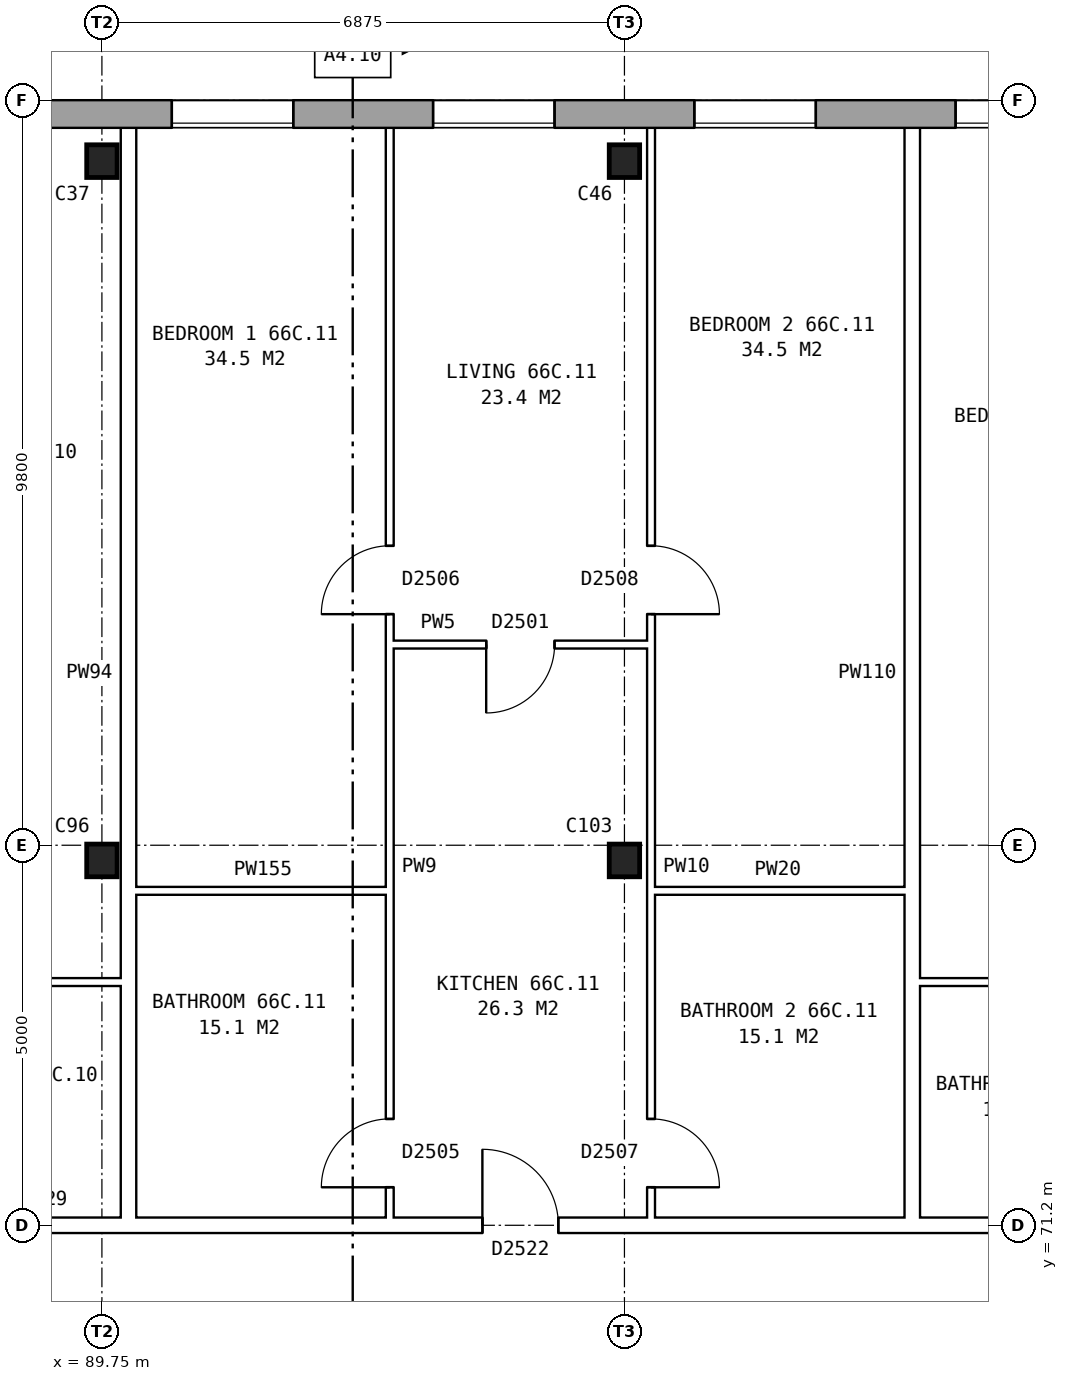
"""IFC4 building model, lengths in metres.
Left out: names, types, materials, properties, quantities, classifications, styles, units other than length and angle.
Written with IfcOpenShell. Run it as: python <this file> out.ifc"""

import sys

from ifc_helpers import new_model, si_unit, direction, frame, frame_2d, origin, origin_2d, place, context, subcontext, project, spatial, rectangle, i_section, extrude, element, fill, save


model = new_model("IFC4")
c1 = context("Model", 3, precision=1e-05, world=origin(), true_north=direction((0.0, 1.0)))
c2 = subcontext(c1, "Body", "Model", "MODEL_VIEW")
j1 = project(units=[si_unit("LENGTHUNIT", "METRE"), si_unit("PLANEANGLEUNIT", "RADIAN")], contexts=[c1])
p1 = place(None, origin())
s1 = spatial("IfcSite", under=j1, at=p1, CompositionType="ELEMENT")
p2 = place(p1, origin())
s2 = spatial("IfcBuilding", under=s1, at=p2, CompositionType="ELEMENT")
p3 = place(p2, frame((0.0, 0.0, 233.8)))
s3 = spatial("IfcBuildingStorey", under=s2, at=p3, CompositionType="ELEMENT", Elevation=233.8)
for number, where, z_axis, x_axis in (
    (1, (89.75, 76.0, 0.0), (0.0, 0.0, 1.0), (1.0, 0.0, 0.0)),
    (2, (96.625, 76.0, 0.0), (0.0, 0.0, 1.0), (1.0, 0.0, 0.0)),
    (3, (89.75, 85.2, 0.0), (0.0, 0.0, 1.0), (1.0, 0.0, 0.0)),
    (4, (96.625, 85.2, 0.0), (0.0, 0.0, 1.0), (1.0, 0.0, 0.0)),
):
    element("IfcColumn", number, at=place(p3, frame(where, z_axis=z_axis, x_axis=x_axis)), inside=s3, PredefinedType="COLUMN", context=c2, shape_type="SweptSolid", body=[
        extrude(i_section(OverallWidth=0.4, OverallDepth=0.43, WebThickness=0.028, FlangeThickness=0.04, at=origin_2d()), origin(), (0.0, 0.0, 1.0), 2.85),
    ])
p4 = place(p3, frame((131.05, 85.82, 0.0), z_axis=(0.0, 0.0, 1.0), x_axis=(-1.0, 0.0, 0.0)))
e5 = element("IfcWall", 5, at=p4, inside=s3, PredefinedType="STANDARD", context=c2, shape_type="SweptSolid", body=[
    extrude(rectangle(XDim=55.1, YDim=0.36, at=frame_2d((27.55, 0.0))), origin(), (0.0, 0.0, 1.0), 2.85),
])
p5 = place(p4, frame((0.969, 0.0, 0.8)))
e6 = element("IfcOpeningElement", 6, at=p5, cuts=e5, PredefinedType="OPENING", context=c2, shape_type="SweptSolid", body=[
    extrude(rectangle(XDim=1.6, YDim=1.8, at=frame_2d((0.8, 0.9))), frame((0.0, 0.19, 0.0), z_axis=(0.0, -1.0, 0.0), x_axis=(1.0, 0.0, 0.0)), (0.0, 0.0, 1.0), 0.38),
])
p6 = place(p4, frame((4.406, 0.0, 0.8)))
e7 = element("IfcOpeningElement", 7, at=p6, cuts=e5, PredefinedType="OPENING", context=c2, shape_type="SweptSolid", body=[
    extrude(rectangle(XDim=1.6, YDim=1.8, at=frame_2d((0.8, 0.9))), frame((0.0, 0.19, 0.0), z_axis=(0.0, -1.0, 0.0), x_axis=(1.0, 0.0, 0.0)), (0.0, 0.0, 1.0), 0.38),
])
p7 = place(p4, frame((7.844, 0.0, 0.8)))
e8 = element("IfcOpeningElement", 8, at=p7, cuts=e5, PredefinedType="OPENING", context=c2, shape_type="SweptSolid", body=[
    extrude(rectangle(XDim=1.6, YDim=1.8, at=frame_2d((0.8, 0.9))), frame((0.0, 0.19, 0.0), z_axis=(0.0, -1.0, 0.0), x_axis=(1.0, 0.0, 0.0)), (0.0, 0.0, 1.0), 0.38),
])
p8 = place(p4, frame((11.281, 0.0, 0.8)))
e9 = element("IfcOpeningElement", 9, at=p8, cuts=e5, PredefinedType="OPENING", context=c2, shape_type="SweptSolid", body=[
    extrude(rectangle(XDim=1.6, YDim=1.8, at=frame_2d((0.8, 0.9))), frame((0.0, 0.19, 0.0), z_axis=(0.0, -1.0, 0.0), x_axis=(1.0, 0.0, 0.0)), (0.0, 0.0, 1.0), 0.38),
])
p9 = place(p4, frame((14.719, 0.0, 0.8)))
e10 = element("IfcOpeningElement", 10, at=p9, cuts=e5, PredefinedType="OPENING", context=c2, shape_type="SweptSolid", body=[
    extrude(rectangle(XDim=1.6, YDim=1.8, at=frame_2d((0.8, 0.9))), frame((0.0, 0.19, 0.0), z_axis=(0.0, -1.0, 0.0), x_axis=(1.0, 0.0, 0.0)), (0.0, 0.0, 1.0), 0.38),
])
p10 = place(p4, frame((18.156, 0.0, 0.8)))
e11 = element("IfcOpeningElement", 11, at=p10, cuts=e5, PredefinedType="OPENING", context=c2, shape_type="SweptSolid", body=[
    extrude(rectangle(XDim=1.6, YDim=1.8, at=frame_2d((0.8, 0.9))), frame((0.0, 0.19, 0.0), z_axis=(0.0, -1.0, 0.0), x_axis=(1.0, 0.0, 0.0)), (0.0, 0.0, 1.0), 0.38),
])
p11 = place(p4, frame((21.594, 0.0, 0.8)))
e12 = element("IfcOpeningElement", 12, at=p11, cuts=e5, PredefinedType="OPENING", context=c2, shape_type="SweptSolid", body=[
    extrude(rectangle(XDim=1.6, YDim=1.8, at=frame_2d((0.8, 0.9))), frame((0.0, 0.19, 0.0), z_axis=(0.0, -1.0, 0.0), x_axis=(1.0, 0.0, 0.0)), (0.0, 0.0, 1.0), 0.38),
])
p12 = place(p4, frame((25.031, 0.0, 0.8)))
e13 = element("IfcOpeningElement", 13, at=p12, cuts=e5, PredefinedType="OPENING", context=c2, shape_type="SweptSolid", body=[
    extrude(rectangle(XDim=1.6, YDim=1.8, at=frame_2d((0.8, 0.9))), frame((0.0, 0.19, 0.0), z_axis=(0.0, -1.0, 0.0), x_axis=(1.0, 0.0, 0.0)), (0.0, 0.0, 1.0), 0.38),
])
p13 = place(p4, frame((28.469, 0.0, 0.8)))
e14 = element("IfcOpeningElement", 14, at=p13, cuts=e5, PredefinedType="OPENING", context=c2, shape_type="SweptSolid", body=[
    extrude(rectangle(XDim=1.6, YDim=1.8, at=frame_2d((0.8, 0.9))), frame((0.0, 0.19, 0.0), z_axis=(0.0, -1.0, 0.0), x_axis=(1.0, 0.0, 0.0)), (0.0, 0.0, 1.0), 0.38),
])
p14 = place(p4, frame((31.906, 0.0, 0.8)))
e15 = element("IfcOpeningElement", 15, at=p14, cuts=e5, PredefinedType="OPENING", context=c2, shape_type="SweptSolid", body=[
    extrude(rectangle(XDim=1.6, YDim=1.8, at=frame_2d((0.8, 0.9))), frame((0.0, 0.19, 0.0), z_axis=(0.0, -1.0, 0.0), x_axis=(1.0, 0.0, 0.0)), (0.0, 0.0, 1.0), 0.38),
])
p15 = place(p4, frame((35.344, 0.0, 0.8)))
e16 = element("IfcOpeningElement", 16, at=p15, cuts=e5, PredefinedType="OPENING", context=c2, shape_type="SweptSolid", body=[
    extrude(rectangle(XDim=1.6, YDim=1.8, at=frame_2d((0.8, 0.9))), frame((0.0, 0.19, 0.0), z_axis=(0.0, -1.0, 0.0), x_axis=(1.0, 0.0, 0.0)), (0.0, 0.0, 1.0), 0.38),
])
p16 = place(p4, frame((38.781, 0.0, 0.8)))
e17 = element("IfcOpeningElement", 17, at=p16, cuts=e5, PredefinedType="OPENING", context=c2, shape_type="SweptSolid", body=[
    extrude(rectangle(XDim=1.6, YDim=1.8, at=frame_2d((0.8, 0.9))), frame((0.0, 0.19, 0.0), z_axis=(0.0, -1.0, 0.0), x_axis=(1.0, 0.0, 0.0)), (0.0, 0.0, 1.0), 0.38),
])
p17 = place(p4, frame((42.219, 0.0, 0.8)))
e18 = element("IfcOpeningElement", 18, at=p17, cuts=e5, PredefinedType="OPENING", context=c2, shape_type="SweptSolid", body=[
    extrude(rectangle(XDim=1.6, YDim=1.8, at=frame_2d((0.8, 0.9))), frame((0.0, 0.19, 0.0), z_axis=(0.0, -1.0, 0.0), x_axis=(1.0, 0.0, 0.0)), (0.0, 0.0, 1.0), 0.38),
])
p18 = place(p4, frame((45.656, 0.0, 0.8)))
e19 = element("IfcOpeningElement", 19, at=p18, cuts=e5, PredefinedType="OPENING", context=c2, shape_type="SweptSolid", body=[
    extrude(rectangle(XDim=1.6, YDim=1.8, at=frame_2d((0.8, 0.9))), frame((0.0, 0.19, 0.0), z_axis=(0.0, -1.0, 0.0), x_axis=(1.0, 0.0, 0.0)), (0.0, 0.0, 1.0), 0.38),
])
p19 = place(p4, frame((49.094, 0.0, 0.8)))
e20 = element("IfcOpeningElement", 20, at=p19, cuts=e5, PredefinedType="OPENING", context=c2, shape_type="SweptSolid", body=[
    extrude(rectangle(XDim=1.6, YDim=1.8, at=frame_2d((0.8, 0.9))), frame((0.0, 0.19, 0.0), z_axis=(0.0, -1.0, 0.0), x_axis=(1.0, 0.0, 0.0)), (0.0, 0.0, 1.0), 0.38),
])
p20 = place(p4, frame((52.531, 0.0, 0.8)))
e21 = element("IfcOpeningElement", 21, at=p20, cuts=e5, PredefinedType="OPENING", context=c2, shape_type="SweptSolid", body=[
    extrude(rectangle(XDim=1.6, YDim=1.8, at=frame_2d((0.8, 0.9))), frame((0.0, 0.19, 0.0), z_axis=(0.0, -1.0, 0.0), x_axis=(1.0, 0.0, 0.0)), (0.0, 0.0, 1.0), 0.38),
])
p21 = place(p3, frame((83.225, 71.2, 0.0), z_axis=(0.0, 0.0, 1.0), x_axis=(1.0, 0.0, 0.0)))
e22 = element("IfcWall", 22, at=p21, inside=s3, PredefinedType="PARTITIONING", context=c2, shape_type="SweptSolid", body=[
    extrude(rectangle(XDim=41.25, YDim=0.2, at=frame_2d((20.625, 0.0))), origin(), (0.0, 0.0, 1.0), 2.85),
])
p22 = place(p21, frame((11.531, 0.0, 0.0)))
e23 = element("IfcOpeningElement", 23, at=p22, cuts=e22, PredefinedType="OPENING", context=c2, shape_type="SweptSolid", body=[
    extrude(rectangle(XDim=1.0, YDim=2.1, at=frame_2d((0.5, 1.05))), frame((0.0, 0.11, 0.0), z_axis=(0.0, -1.0, 0.0), x_axis=(1.0, 0.0, 0.0)), (0.0, 0.0, 1.0), 0.22),
])
p23 = place(p21, frame((21.844, 0.0, 0.0)))
e24 = element("IfcOpeningElement", 24, at=p23, cuts=e22, PredefinedType="OPENING", context=c2, shape_type="SweptSolid", body=[
    extrude(rectangle(XDim=1.0, YDim=2.1, at=frame_2d((0.5, 1.05))), frame((0.0, 0.11, 0.0), z_axis=(0.0, -1.0, 0.0), x_axis=(1.0, 0.0, 0.0)), (0.0, 0.0, 1.0), 0.22),
])
p24 = place(p21, frame((32.156, 0.0, 0.0)))
e25 = element("IfcOpeningElement", 25, at=p24, cuts=e22, PredefinedType="OPENING", context=c2, shape_type="SweptSolid", body=[
    extrude(rectangle(XDim=1.0, YDim=2.1, at=frame_2d((0.5, 1.05))), frame((0.0, 0.11, 0.0), z_axis=(0.0, -1.0, 0.0), x_axis=(1.0, 0.0, 0.0)), (0.0, 0.0, 1.0), 0.22),
])
p25 = place(p3, frame((86.662, 74.4, 0.0), z_axis=(0.0, 0.0, 1.0), x_axis=(1.0, 0.0, 0.0)))
e26 = element("IfcWall", 26, at=p25, inside=s3, PredefinedType="PARTITIONING", context=c2, shape_type="SweptSolid", body=[
    extrude(rectangle(XDim=3.338, YDim=0.1, at=frame_2d((1.669, 0.0))), origin(), (0.0, 0.0, 1.0), 2.85),
])
p26 = place(p3, frame((100.512, 74.4, 0.0), z_axis=(0.0, 0.0, 1.0), x_axis=(1.0, 0.0, 0.0)))
e27 = element("IfcWall", 27, at=p26, inside=s3, PredefinedType="PARTITIONING", context=c2, shape_type="SweptSolid", body=[
    extrude(rectangle(XDim=3.338, YDim=0.1, at=frame_2d((1.669, 0.0))), origin(), (0.0, 0.0, 1.0), 2.85),
])
p27 = place(p3, frame((90.2, 75.6, 0.0), z_axis=(0.0, 0.0, 1.0), x_axis=(1.0, 0.0, 0.0)))
e28 = element("IfcWall", 28, at=p27, inside=s3, PredefinedType="PARTITIONING", context=c2, shape_type="SweptSolid", body=[
    extrude(rectangle(XDim=3.337, YDim=0.1, at=frame_2d((1.668, 0.0))), origin(), (0.0, 0.0, 1.0), 2.85),
])
p28 = place(p3, frame((96.975, 75.6, 0.0), z_axis=(0.0, 0.0, 1.0), x_axis=(1.0, 0.0, 0.0)))
e29 = element("IfcWall", 29, at=p28, inside=s3, PredefinedType="PARTITIONING", context=c2, shape_type="SweptSolid", body=[
    extrude(rectangle(XDim=3.337, YDim=0.1, at=frame_2d((1.668, 0.0))), origin(), (0.0, 0.0, 1.0), 2.85),
])
p29 = place(p3, frame((93.537, 78.84, 0.0), z_axis=(0.0, 0.0, 1.0), x_axis=(1.0, 0.0, 0.0)))
e30 = element("IfcWall", 30, at=p29, inside=s3, PredefinedType="PARTITIONING", context=c2, shape_type="SweptSolid", body=[
    extrude(rectangle(XDim=3.438, YDim=0.1, at=frame_2d((1.719, 0.0))), origin(), (0.0, 0.0, 1.0), 2.85),
])
p30 = place(p29, frame((1.269, 0.0, 0.0)))
e31 = element("IfcOpeningElement", 31, at=p30, cuts=e30, PredefinedType="OPENING", context=c2, shape_type="SweptSolid", body=[
    extrude(rectangle(XDim=0.9, YDim=2.1, at=frame_2d((0.45, 1.05))), frame((0.0, 0.06, 0.0), z_axis=(0.0, -1.0, 0.0), x_axis=(1.0, 0.0, 0.0)), (0.0, 0.0, 1.0), 0.12),
])
p31 = place(p3, frame((90.1, 71.3, 0.0), z_axis=(0.0, 0.0, 1.0), x_axis=(0.0, 1.0, 0.0)))
e32 = element("IfcWall", 32, at=p31, inside=s3, PredefinedType="PARTITIONING", context=c2, shape_type="SweptSolid", body=[
    extrude(rectangle(XDim=14.34, YDim=0.2, at=frame_2d((7.17, 0.0))), origin(), (0.0, 0.0, 1.0), 2.85),
])
p32 = place(p3, frame((93.537, 71.3, 0.0), z_axis=(0.0, 0.0, 1.0), x_axis=(0.0, 1.0, 0.0)))
e33 = element("IfcWall", 33, at=p32, inside=s3, PredefinedType="PARTITIONING", context=c2, shape_type="SweptSolid", body=[
    extrude(rectangle(XDim=14.34, YDim=0.1, at=frame_2d((7.17, 0.0))), origin(), (0.0, 0.0, 1.0), 2.85),
])
p33 = place(p32, frame((7.94, 0.0, 0.0)))
e34 = element("IfcOpeningElement", 34, at=p33, cuts=e33, PredefinedType="OPENING", context=c2, shape_type="SweptSolid", body=[
    extrude(rectangle(XDim=0.9, YDim=2.1, at=frame_2d((0.45, 1.05))), frame((0.0, 0.06, 0.0), z_axis=(0.0, -1.0, 0.0), x_axis=(1.0, 0.0, 0.0)), (0.0, 0.0, 1.0), 0.12),
])
p34 = place(p32, frame((0.4, 0.0, 0.0)))
e35 = element("IfcOpeningElement", 35, at=p34, cuts=e33, PredefinedType="OPENING", context=c2, shape_type="SweptSolid", body=[
    extrude(rectangle(XDim=0.9, YDim=2.1, at=frame_2d((0.45, 1.05))), frame((0.0, 0.06, 0.0), z_axis=(0.0, -1.0, 0.0), x_axis=(1.0, 0.0, 0.0)), (0.0, 0.0, 1.0), 0.12),
])
p35 = place(p3, frame((96.975, 71.3, 0.0), z_axis=(0.0, 0.0, 1.0), x_axis=(0.0, 1.0, 0.0)))
e36 = element("IfcWall", 36, at=p35, inside=s3, PredefinedType="PARTITIONING", context=c2, shape_type="SweptSolid", body=[
    extrude(rectangle(XDim=14.34, YDim=0.1, at=frame_2d((7.17, 0.0))), origin(), (0.0, 0.0, 1.0), 2.85),
])
p36 = place(p35, frame((7.94, 0.0, 0.0)))
e37 = element("IfcOpeningElement", 37, at=p36, cuts=e36, PredefinedType="OPENING", context=c2, shape_type="SweptSolid", body=[
    extrude(rectangle(XDim=0.9, YDim=2.1, at=frame_2d((0.45, 1.05))), frame((0.0, 0.06, 0.0), z_axis=(0.0, -1.0, 0.0), x_axis=(1.0, 0.0, 0.0)), (0.0, 0.0, 1.0), 0.12),
])
p37 = place(p35, frame((0.4, 0.0, 0.0)))
e38 = element("IfcOpeningElement", 38, at=p37, cuts=e36, PredefinedType="OPENING", context=c2, shape_type="SweptSolid", body=[
    extrude(rectangle(XDim=0.9, YDim=2.1, at=frame_2d((0.45, 1.05))), frame((0.0, 0.06, 0.0), z_axis=(0.0, -1.0, 0.0), x_axis=(1.0, 0.0, 0.0)), (0.0, 0.0, 1.0), 0.12),
])
p38 = place(p3, frame((100.412, 71.3, 0.0), z_axis=(0.0, 0.0, 1.0), x_axis=(0.0, 1.0, 0.0)))
e39 = element("IfcWall", 39, at=p38, inside=s3, PredefinedType="PARTITIONING", context=c2, shape_type="SweptSolid", body=[
    extrude(rectangle(XDim=14.34, YDim=0.2, at=frame_2d((7.17, 0.0))), origin(), (0.0, 0.0, 1.0), 2.85),
])
p39 = place(p13, origin())
e40 = element("IfcWindow", 40, at=p39, inside=s3, PartitioningType="SINGLE_PANEL", PredefinedType="WINDOW", context=c2, shape_type="SweptSolid", body=[
    extrude(rectangle(XDim=1.6, YDim=1.8, at=frame_2d((0.8, 0.9))), frame((0.0, 0.15, 0.0), z_axis=(0.0, -1.0, 0.0), x_axis=(1.0, 0.0, 0.0)), (0.0, 0.0, 1.0), 0.06),
])
fill(e14, e40)
p40 = place(p14, origin())
e41 = element("IfcWindow", 41, at=p40, inside=s3, PartitioningType="SINGLE_PANEL", PredefinedType="WINDOW", context=c2, shape_type="SweptSolid", body=[
    extrude(rectangle(XDim=1.6, YDim=1.8, at=frame_2d((0.8, 0.9))), frame((0.0, 0.15, 0.0), z_axis=(0.0, -1.0, 0.0), x_axis=(1.0, 0.0, 0.0)), (0.0, 0.0, 1.0), 0.06),
])
fill(e15, e41)
p41 = place(p15, origin())
e42 = element("IfcWindow", 42, at=p41, inside=s3, PartitioningType="SINGLE_PANEL", PredefinedType="WINDOW", context=c2, shape_type="SweptSolid", body=[
    extrude(rectangle(XDim=1.6, YDim=1.8, at=frame_2d((0.8, 0.9))), frame((0.0, 0.15, 0.0), z_axis=(0.0, -1.0, 0.0), x_axis=(1.0, 0.0, 0.0)), (0.0, 0.0, 1.0), 0.06),
])
fill(e16, e42)
p42 = place(p16, origin())
e43 = element("IfcWindow", 43, at=p42, inside=s3, PartitioningType="SINGLE_PANEL", PredefinedType="WINDOW", context=c2, shape_type="SweptSolid", body=[
    extrude(rectangle(XDim=1.6, YDim=1.8, at=frame_2d((0.8, 0.9))), frame((0.0, 0.15, 0.0), z_axis=(0.0, -1.0, 0.0), x_axis=(1.0, 0.0, 0.0)), (0.0, 0.0, 1.0), 0.06),
])
fill(e17, e43)
p43 = place(p33, origin())
e44 = element("IfcDoor", 44, at=p43, inside=s3, OperationType="SINGLE_SWING_LEFT", PredefinedType="DOOR", context=c2, shape_type="SweptSolid", body=[
    extrude(rectangle(XDim=0.9, YDim=2.1, at=frame_2d((0.45, 1.05))), frame((0.0, 0.025, 0.0), z_axis=(0.0, -1.0, 0.0), x_axis=(1.0, 0.0, 0.0)), (0.0, 0.0, 1.0), 0.05),
])
fill(e34, e44)
p44 = place(p36, frame((0.9, 0.0, 0.0), z_axis=(0.0, 0.0, 1.0), x_axis=(-1.0, 0.0, 0.0)))
e45 = element("IfcDoor", 45, at=p44, inside=s3, OperationType="SINGLE_SWING_RIGHT", PredefinedType="DOOR", context=c2, shape_type="SweptSolid", body=[
    extrude(rectangle(XDim=0.9, YDim=2.1, at=frame_2d((0.45, 1.05))), frame((0.0, 0.025, 0.0), z_axis=(0.0, -1.0, 0.0), x_axis=(1.0, 0.0, 0.0)), (0.0, 0.0, 1.0), 0.05),
])
fill(e37, e45)
p45 = place(p22, origin())
e46 = element("IfcDoor", 46, at=p45, inside=s3, OperationType="SINGLE_SWING_LEFT", PredefinedType="DOOR", context=c2, shape_type="SweptSolid", body=[
    extrude(rectangle(XDim=1.0, YDim=2.1, at=frame_2d((0.5, 1.05))), frame((0.0, 0.025, 0.0), z_axis=(0.0, -1.0, 0.0), x_axis=(1.0, 0.0, 0.0)), (0.0, 0.0, 1.0), 0.05),
])
fill(e23, e46)
p46 = place(p30, frame((0.9, 0.0, 0.0), z_axis=(0.0, 0.0, 1.0), x_axis=(-1.0, 0.0, 0.0)))
e47 = element("IfcDoor", 47, at=p46, inside=s3, OperationType="SINGLE_SWING_RIGHT", PredefinedType="DOOR", context=c2, shape_type="SweptSolid", body=[
    extrude(rectangle(XDim=0.9, YDim=2.1, at=frame_2d((0.45, 1.05))), frame((0.0, 0.025, 0.0), z_axis=(0.0, -1.0, 0.0), x_axis=(1.0, 0.0, 0.0)), (0.0, 0.0, 1.0), 0.05),
])
fill(e31, e47)
p47 = place(p34, origin())
e48 = element("IfcDoor", 48, at=p47, inside=s3, OperationType="SINGLE_SWING_LEFT", PredefinedType="DOOR", context=c2, shape_type="SweptSolid", body=[
    extrude(rectangle(XDim=0.9, YDim=2.1, at=frame_2d((0.45, 1.05))), frame((0.0, 0.025, 0.0), z_axis=(0.0, -1.0, 0.0), x_axis=(1.0, 0.0, 0.0)), (0.0, 0.0, 1.0), 0.05),
])
fill(e35, e48)
p48 = place(p37, frame((0.9, 0.0, 0.0), z_axis=(0.0, 0.0, 1.0), x_axis=(-1.0, 0.0, 0.0)))
e49 = element("IfcDoor", 49, at=p48, inside=s3, OperationType="SINGLE_SWING_RIGHT", PredefinedType="DOOR", context=c2, shape_type="SweptSolid", body=[
    extrude(rectangle(XDim=0.9, YDim=2.1, at=frame_2d((0.45, 1.05))), frame((0.0, 0.025, 0.0), z_axis=(0.0, -1.0, 0.0), x_axis=(1.0, 0.0, 0.0)), (0.0, 0.0, 1.0), 0.05),
])
fill(e38, e49)
save(model, sys.argv[1])
